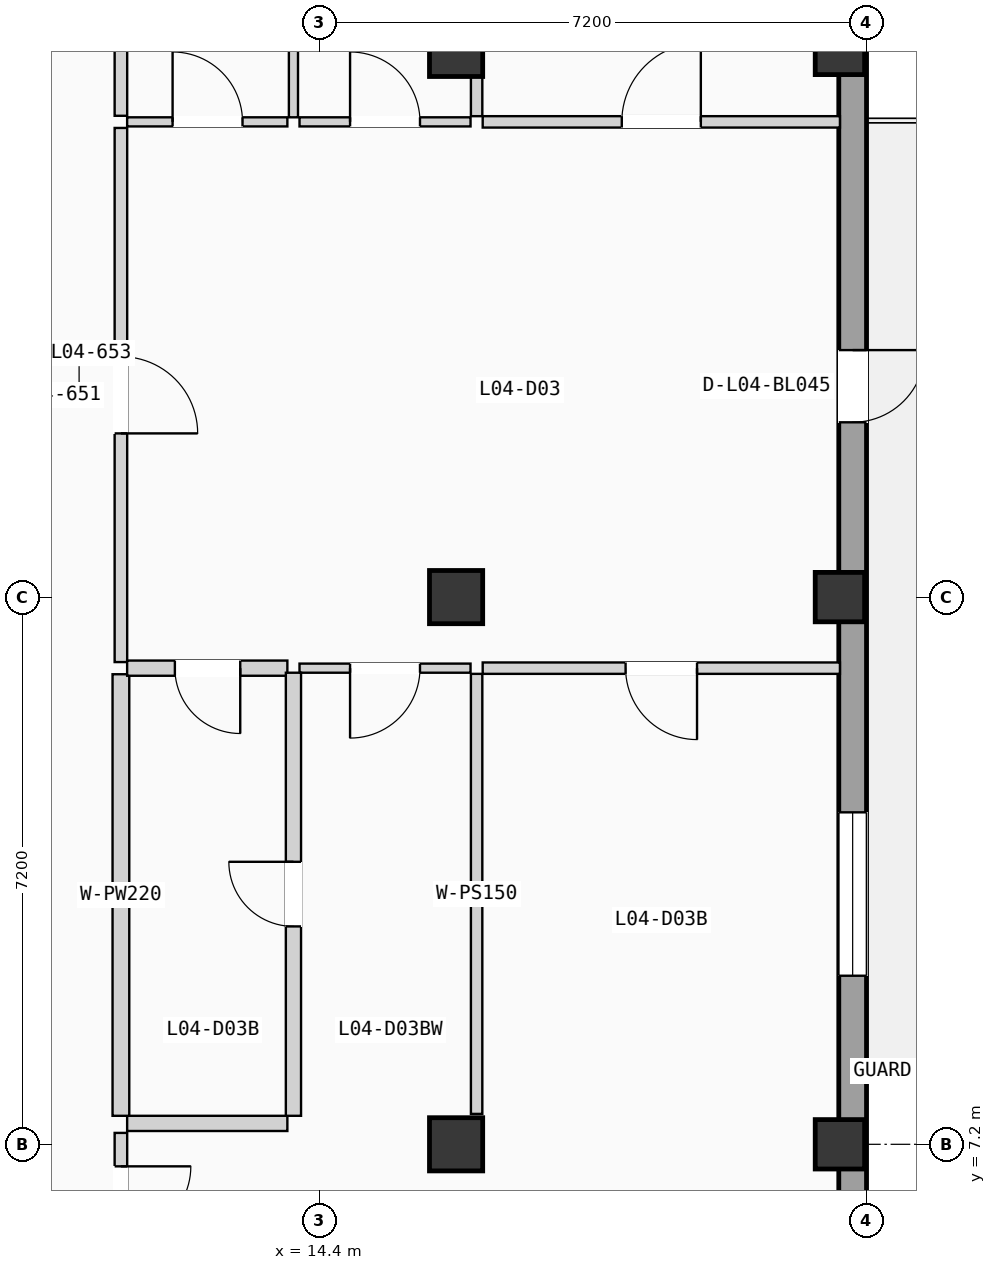
"""IFC4 building model, lengths in metres.
Left out: names, types, materials, properties, quantities, classifications, styles, units other than length and angle.
Written with IfcOpenShell. Run it as: python <this file> out.ifc"""

import sys

from ifc_helpers import new_model, si_unit, direction, frame, frame_2d, origin, origin_2d, place, context, subcontext, project, spatial, rectangle, extrude, element, fill, save


model = new_model("IFC4")
c1 = context("Model", 3, precision=1e-05, world=origin(), true_north=direction((0.0, 1.0)))
c2 = subcontext(c1, "Body", "Model", "MODEL_VIEW")
j1 = project(units=[si_unit("LENGTHUNIT", "METRE"), si_unit("PLANEANGLEUNIT", "RADIAN")], contexts=[c1])
p1 = place(None, origin())
s1 = spatial("IfcSite", under=j1, at=p1, CompositionType="ELEMENT")
p2 = place(p1, origin())
s2 = spatial("IfcBuilding", under=s1, at=p2, CompositionType="ELEMENT")
p3 = place(p2, frame((0.0, 0.0, 15.225)))
s3 = spatial("IfcBuildingStorey", under=s2, at=p3, CompositionType="ELEMENT", Elevation=15.225)
for number, where, z_axis, x_axis in (
    (1, (16.2, 7.2, 0.0), (0.0, 0.0, 1.0), (1.0, 0.0, 0.0)),
    (2, (16.2, 14.4, 0.0), (0.0, 0.0, 1.0), (1.0, 0.0, 0.0)),
    (3, (16.2, 21.6, 0.0), (0.0, 0.0, 1.0), (1.0, 0.0, 0.0)),
):
    element("IfcColumn", number, at=place(p3, frame(where, z_axis=z_axis, x_axis=x_axis)), inside=s3, PredefinedType="COLUMN", context=c2, shape_type="SweptSolid", body=[
        extrude(rectangle(XDim=0.7, YDim=0.7, at=origin_2d()), origin(), (0.0, 0.0, 1.0), 3.15),
    ])
for number, where, z_axis, x_axis in (
    (4, (21.25, 7.2, 0.0), (0.0, 0.0, 1.0), (1.0, 0.0, 0.0)),
    (5, (21.25, 14.4, 0.0), (0.0, 0.0, 1.0), (1.0, 0.0, 0.0)),
    (6, (21.25, 21.6, 0.0), (0.0, 0.0, 1.0), (1.0, 0.0, 0.0)),
):
    element("IfcColumn", number, at=place(p3, frame(where, z_axis=z_axis, x_axis=x_axis)), inside=s3, PredefinedType="COLUMN", context=c2, shape_type="SweptSolid", body=[
        extrude(rectangle(XDim=0.65, YDim=0.65, at=origin_2d()), origin(), (0.0, 0.0, 1.0), 3.15),
    ])
p4 = place(p3, frame((21.417, 0.365, 0.0), z_axis=(0.0, 0.0, 1.0), x_axis=(0.0, 1.0, 0.0)))
e7 = element("IfcWall", 7, at=p4, inside=s3, PredefinedType="SOLIDWALL", context=c2, shape_type="SweptSolid", body=[
    extrude(rectangle(XDim=49.67, YDim=0.365, at=frame_2d((24.835, 0.0))), origin(), (0.0, 0.0, 1.0), 2.89),
])
p5 = place(p4, frame((16.335, 0.0, 0.0)))
e8 = element("IfcOpeningElement", 8, at=p5, cuts=e7, PredefinedType="OPENING", context=c2, shape_type="SweptSolid", body=[
    extrude(rectangle(XDim=0.95, YDim=2.15, at=frame_2d((0.475, 1.075))), frame((0.0, 0.192, 0.0), z_axis=(0.0, -1.0, 0.0), x_axis=(1.0, 0.0, 0.0)), (0.0, 0.0, 1.0), 0.385),
])
p6 = place(p4, frame((9.053, 0.0, 0.9)))
e9 = element("IfcOpeningElement", 9, at=p6, cuts=e7, PredefinedType="OPENING", context=c2, shape_type="SweptSolid", body=[
    extrude(rectangle(XDim=2.15, YDim=1.2, at=frame_2d((1.075, 0.6))), frame((0.0, 0.192, 0.0), z_axis=(0.0, -1.0, 0.0), x_axis=(1.0, 0.0, 0.0)), (0.0, 0.0, 1.0), 0.385),
])
p7 = place(p4, frame((22.754, 0.0, 0.855)))
e10 = element("IfcOpeningElement", 10, at=p7, cuts=e7, PredefinedType="OPENING", context=c2, shape_type="SweptSolid", body=[
    extrude(rectangle(XDim=2.15, YDim=1.35, at=frame_2d((1.075, 0.675))), frame((0.0, 0.192, 0.0), z_axis=(0.0, -1.0, 0.0), x_axis=(1.0, 0.0, 0.0)), (0.0, 0.0, 1.0), 0.385),
])
p8 = place(p4, frame((32.43, 0.0, 0.0)))
e11 = element("IfcOpeningElement", 11, at=p8, cuts=e7, PredefinedType="OPENING", context=c2, shape_type="SweptSolid", body=[
    extrude(rectangle(XDim=1.08, YDim=2.18, at=frame_2d((0.54, 1.09))), frame((0.0, 0.192, 0.0), z_axis=(0.0, -1.0, 0.0), x_axis=(1.0, 0.0, 0.0)), (0.0, 0.0, 1.0), 0.385),
])
p9 = place(p4, frame((29.5, 0.0, 0.85)))
e12 = element("IfcOpeningElement", 12, at=p9, cuts=e7, PredefinedType="OPENING", context=c2, shape_type="SweptSolid", body=[
    extrude(rectangle(XDim=0.95, YDim=1.2, at=frame_2d((0.475, 0.6))), frame((0.0, 0.192, 0.0), z_axis=(0.0, -1.0, 0.0), x_axis=(1.0, 0.0, 0.0)), (0.0, 0.0, 1.0), 0.385),
])
p10 = place(p4, frame((38.904, 0.0, 0.555)))
e13 = element("IfcOpeningElement", 13, at=p10, cuts=e7, PredefinedType="OPENING", context=c2, shape_type="SweptSolid", body=[
    extrude(rectangle(XDim=2.15, YDim=1.65, at=frame_2d((1.075, 0.825))), frame((0.0, 0.192, 0.0), z_axis=(0.0, -1.0, 0.0), x_axis=(1.0, 0.0, 0.0)), (0.0, 0.0, 1.0), 0.385),
])
p11 = place(p3, frame((11.79, 5.53, 0.0), z_axis=(0.0, 0.0, 1.0), x_axis=(0.0, 1.0, 0.0)))
e14 = element("IfcWall", 14, at=p11, inside=s3, PredefinedType="PARTITIONING", context=c2, shape_type="SweptSolid", body=[
    extrude(rectangle(XDim=1.82, YDim=0.165, at=frame_2d((0.91, 0.0))), origin(), (0.0, 0.0, 1.0), 2.87),
])
p12 = place(p11, frame((0.46, 0.0, 0.0)))
e15 = element("IfcOpeningElement", 15, at=p12, cuts=e14, PredefinedType="OPENING", context=c2, shape_type="SweptSolid", body=[
    extrude(rectangle(XDim=0.92, YDim=2.04, at=frame_2d((0.46, 1.02))), frame((0.0, 0.093, 0.0), z_axis=(0.0, -1.0, 0.0), x_axis=(1.0, 0.0, 0.0)), (0.0, 0.0, 1.0), 0.185),
])
p13 = place(p3, frame((11.872, 7.475, 0.0), z_axis=(0.0, 0.0, 1.0), x_axis=(1.0, 0.0, 0.0)))
e16 = element("IfcWall", 16, at=p13, inside=s3, PredefinedType="PLUMBINGWALL", context=c2, shape_type="SweptSolid", body=[
    extrude(rectangle(XDim=2.108, YDim=0.2, at=frame_2d((1.054, 0.0))), origin(), (0.0, 0.0, 1.0), 2.87),
])
p14 = place(p3, frame((11.79, 13.545, 0.0), z_axis=(0.0, 0.0, 1.0), x_axis=(0.0, 1.0, 0.0)))
e17 = element("IfcWall", 17, at=p14, inside=s3, PredefinedType="PARTITIONING", context=c2, shape_type="SweptSolid", body=[
    extrude(rectangle(XDim=7.028, YDim=0.165, at=frame_2d((3.514, 0.0))), origin(), (0.0, 0.0, 1.0), 2.87),
])
p15 = place(p14, frame((3.009, 0.0, 0.0)))
e18 = element("IfcOpeningElement", 18, at=p15, cuts=e17, PredefinedType="OPENING", context=c2, shape_type="SweptSolid", body=[
    extrude(rectangle(XDim=1.01, YDim=2.11, at=frame_2d((0.505, 1.055))), frame((0.0, 0.093, 0.0), z_axis=(0.0, -1.0, 0.0), x_axis=(1.0, 0.0, 0.0)), (0.0, 0.0, 1.0), 0.185),
])
p16 = place(p3, frame((11.79, 7.575, 0.0), z_axis=(0.0, 0.0, 1.0), x_axis=(0.0, 1.0, 0.0)))
e19 = element("IfcWall", 19, at=p16, inside=s3, PredefinedType="PLUMBINGWALL", context=c2, shape_type="SweptSolid", body=[
    extrude(rectangle(XDim=5.81, YDim=0.22, at=frame_2d((2.905, 0.0))), origin(), (0.0, 0.0, 1.0), 2.87),
])
p17 = place(p3, frame((11.79, 20.733, 0.0), z_axis=(0.0, 0.0, 1.0), x_axis=(0.0, 1.0, 0.0)))
e20 = element("IfcWall", 20, at=p17, inside=s3, PredefinedType="PARTITIONING", context=c2, shape_type="SweptSolid", body=[
    extrude(rectangle(XDim=5.785, YDim=0.165, at=frame_2d((2.893, 0.0))), origin(), (0.0, 0.0, 1.0), 2.87),
])
p18 = place(p3, frame((11.872, 13.465, 0.0), z_axis=(0.0, 0.0, 1.0), x_axis=(1.0, 0.0, 0.0)))
e21 = element("IfcWall", 21, at=p18, inside=s3, PredefinedType="PLUMBINGWALL", context=c2, shape_type="SweptSolid", body=[
    extrude(rectangle(XDim=2.108, YDim=0.2, at=frame_2d((1.054, 0.0))), origin(), (0.0, 0.0, 1.0), 2.87),
])
p19 = place(p18, frame((0.628, 0.0, 0.0)))
e22 = element("IfcOpeningElement", 22, at=p19, cuts=e21, PredefinedType="OPENING", context=c2, shape_type="SweptSolid", body=[
    extrude(rectangle(XDim=0.86, YDim=2.0, at=frame_2d((0.43, 1.0))), frame((0.0, 0.11, 0.0), z_axis=(0.0, -1.0, 0.0), x_axis=(1.0, 0.0, 0.0)), (0.0, 0.0, 1.0), 0.22),
])
p20 = place(p3, frame((11.872, 20.653, 0.0), z_axis=(0.0, 0.0, 1.0), x_axis=(1.0, 0.0, 0.0)))
e23 = element("IfcWall", 23, at=p20, inside=s3, PredefinedType="PARTITIONING", context=c2, shape_type="SweptSolid", body=[
    extrude(rectangle(XDim=2.108, YDim=0.12, at=frame_2d((1.054, 0.0))), origin(), (0.0, 0.0, 1.0), 2.87),
])
p21 = place(p20, frame((0.598, 0.0, 0.0)))
e24 = element("IfcOpeningElement", 24, at=p21, cuts=e23, PredefinedType="OPENING", context=c2, shape_type="SweptSolid", body=[
    extrude(rectangle(XDim=0.92, YDim=2.02, at=frame_2d((0.46, 1.01))), frame((0.0, 0.07, 0.0), z_axis=(0.0, -1.0, 0.0), x_axis=(1.0, 0.0, 0.0)), (0.0, 0.0, 1.0), 0.14),
])
p22 = place(p3, frame((16.55, 13.465, 0.0), z_axis=(0.0, 0.0, 1.0), x_axis=(1.0, 0.0, 0.0)))
e25 = element("IfcWall", 25, at=p22, inside=s3, PredefinedType="PARTITIONING", context=c2, shape_type="SweptSolid", body=[
    extrude(rectangle(XDim=4.7, YDim=0.15, at=frame_2d((2.35, 0.0))), origin(), (0.0, 0.0, 1.0), 2.87),
])
p23 = place(p22, frame((1.88, 0.0, 0.0)))
e26 = element("IfcOpeningElement", 26, at=p23, cuts=e25, PredefinedType="OPENING", context=c2, shape_type="SweptSolid", body=[
    extrude(rectangle(XDim=0.94, YDim=2.06, at=frame_2d((0.47, 1.03))), frame((0.0, 0.085, 0.0), z_axis=(0.0, -1.0, 0.0), x_axis=(1.0, 0.0, 0.0)), (0.0, 0.0, 1.0), 0.17),
])
p24 = place(p3, frame((14.14, 13.465, 0.0), z_axis=(0.0, 0.0, 1.0), x_axis=(1.0, 0.0, 0.0)))
e27 = element("IfcWall", 27, at=p24, inside=s3, PredefinedType="PARTITIONING", context=c2, shape_type="SweptSolid", body=[
    extrude(rectangle(XDim=2.25, YDim=0.12, at=frame_2d((1.125, 0.0))), origin(), (0.0, 0.0, 1.0), 2.87),
])
p25 = place(p24, frame((0.665, 0.0, 0.0)))
e28 = element("IfcOpeningElement", 28, at=p25, cuts=e27, PredefinedType="OPENING", context=c2, shape_type="SweptSolid", body=[
    extrude(rectangle(XDim=0.92, YDim=2.02, at=frame_2d((0.46, 1.01))), frame((0.0, 0.07, 0.0), z_axis=(0.0, -1.0, 0.0), x_axis=(1.0, 0.0, 0.0)), (0.0, 0.0, 1.0), 0.14),
])
p26 = place(p3, frame((16.55, 20.653, 0.0), z_axis=(0.0, 0.0, 1.0), x_axis=(1.0, 0.0, 0.0)))
e29 = element("IfcWall", 29, at=p26, inside=s3, PredefinedType="PARTITIONING", context=c2, shape_type="SweptSolid", body=[
    extrude(rectangle(XDim=4.7, YDim=0.15, at=frame_2d((2.35, 0.0))), origin(), (0.0, 0.0, 1.0), 2.87),
])
p27 = place(p26, frame((1.83, 0.0, 0.0)))
e30 = element("IfcOpeningElement", 30, at=p27, cuts=e29, PredefinedType="OPENING", context=c2, shape_type="SweptSolid", body=[
    extrude(rectangle(XDim=1.04, YDim=2.08, at=frame_2d((0.52, 1.04))), frame((0.0, 0.085, 0.0), z_axis=(0.0, -1.0, 0.0), x_axis=(1.0, 0.0, 0.0)), (0.0, 0.0, 1.0), 0.17),
])
p28 = place(p3, frame((14.14, 20.653, 0.0), z_axis=(0.0, 0.0, 1.0), x_axis=(1.0, 0.0, 0.0)))
e31 = element("IfcWall", 31, at=p28, inside=s3, PredefinedType="PARTITIONING", context=c2, shape_type="SweptSolid", body=[
    extrude(rectangle(XDim=2.25, YDim=0.12, at=frame_2d((1.125, 0.0))), origin(), (0.0, 0.0, 1.0), 2.87),
])
p29 = place(p28, frame((0.665, 0.0, 0.0)))
e32 = element("IfcOpeningElement", 32, at=p29, cuts=e31, PredefinedType="OPENING", context=c2, shape_type="SweptSolid", body=[
    extrude(rectangle(XDim=0.92, YDim=2.02, at=frame_2d((0.46, 1.01))), frame((0.0, 0.07, 0.0), z_axis=(0.0, -1.0, 0.0), x_axis=(1.0, 0.0, 0.0)), (0.0, 0.0, 1.0), 0.14),
])
p30 = place(p3, frame((14.06, 7.575, 0.0), z_axis=(0.0, 0.0, 1.0), x_axis=(0.0, 1.0, 0.0)))
e33 = element("IfcWall", 33, at=p30, inside=s3, PredefinedType="PLUMBINGWALL", context=c2, shape_type="SweptSolid", body=[
    extrude(rectangle(XDim=5.83, YDim=0.2, at=frame_2d((2.915, 0.0))), origin(), (0.0, 0.0, 1.0), 2.87),
])
p31 = place(p30, frame((2.492, 0.0, 0.0)))
e34 = element("IfcOpeningElement", 34, at=p31, cuts=e33, PredefinedType="OPENING", context=c2, shape_type="SweptSolid", body=[
    extrude(rectangle(XDim=0.85, YDim=2.01, at=frame_2d((0.425, 1.005))), frame((0.0, 0.11, 0.0), z_axis=(0.0, -1.0, 0.0), x_axis=(1.0, 0.0, 0.0)), (0.0, 0.0, 1.0), 0.22),
])
p32 = place(p3, frame((14.06, 20.713, 0.0), z_axis=(0.0, 0.0, 1.0), x_axis=(0.0, 1.0, 0.0)))
e35 = element("IfcWall", 35, at=p32, inside=s3, PredefinedType="PARTITIONING", context=c2, shape_type="SweptSolid", body=[
    extrude(rectangle(XDim=5.805, YDim=0.12, at=frame_2d((2.903, 0.0))), origin(), (0.0, 0.0, 1.0), 2.87),
])
p33 = place(p3, frame((16.47, 7.6, 0.0), z_axis=(0.0, 0.0, 1.0), x_axis=(0.0, 1.0, 0.0)))
e36 = element("IfcWall", 36, at=p33, inside=s3, PredefinedType="PARTITIONING", context=c2, shape_type="SweptSolid", body=[
    extrude(rectangle(XDim=5.79, YDim=0.15, at=frame_2d((2.895, 0.0))), origin(), (0.0, 0.0, 1.0), 2.87),
])
p34 = place(p3, frame((16.47, 20.728, 0.0), z_axis=(0.0, 0.0, 1.0), x_axis=(0.0, 1.0, 0.0)))
e37 = element("IfcWall", 37, at=p34, inside=s3, PredefinedType="PARTITIONING", context=c2, shape_type="SweptSolid", body=[
    extrude(rectangle(XDim=5.79, YDim=0.15, at=frame_2d((2.895, 0.0))), origin(), (0.0, 0.0, 1.0), 2.87),
])
p35 = place(p5, frame((0.95, 0.0, 0.0), z_axis=(0.0, 0.0, 1.0), x_axis=(-1.0, 0.0, 0.0)))
e38 = element("IfcDoor", 38, at=p35, inside=s3, OperationType="SINGLE_SWING_RIGHT", PredefinedType="DOOR", context=c2, shape_type="SweptSolid", body=[
    extrude(rectangle(XDim=0.95, YDim=2.15, at=frame_2d((0.475, 1.075))), frame((0.0, 0.025, 0.0), z_axis=(0.0, -1.0, 0.0), x_axis=(1.0, 0.0, 0.0)), (0.0, 0.0, 1.0), 0.05),
])
fill(e8, e38)
p36 = place(p6, origin())
e39 = element("IfcWindow", 39, at=p36, inside=s3, PartitioningType="DOUBLE_PANEL_VERTICAL", PredefinedType="WINDOW", context=c2, shape_type="SweptSolid", body=[
    extrude(rectangle(XDim=2.15, YDim=1.2, at=frame_2d((1.075, 0.6))), frame((0.0, 0.03, 0.0), z_axis=(0.0, -1.0, 0.0), x_axis=(1.0, 0.0, 0.0)), (0.0, 0.0, 1.0), 0.06),
])
fill(e9, e39)
p37 = place(p12, frame((0.92, 0.0, 0.0), z_axis=(0.0, 0.0, 1.0), x_axis=(-1.0, 0.0, 0.0)))
e40 = element("IfcDoor", 40, at=p37, inside=s3, OperationType="SINGLE_SWING_RIGHT", PredefinedType="DOOR", context=c2, shape_type="SweptSolid", body=[
    extrude(rectangle(XDim=0.92, YDim=2.04, at=frame_2d((0.46, 1.02))), frame((0.0, 0.025, 0.0), z_axis=(0.0, -1.0, 0.0), x_axis=(1.0, 0.0, 0.0)), (0.0, 0.0, 1.0), 0.05),
])
fill(e15, e40)
p38 = place(p15, frame((1.01, 0.0, 0.0), z_axis=(0.0, 0.0, 1.0), x_axis=(-1.0, 0.0, 0.0)))
e41 = element("IfcDoor", 41, at=p38, inside=s3, OperationType="SINGLE_SWING_LEFT", PredefinedType="DOOR", context=c2, shape_type="SweptSolid", body=[
    extrude(rectangle(XDim=1.01, YDim=2.11, at=frame_2d((0.505, 1.055))), frame((0.0, 0.025, 0.0), z_axis=(0.0, -1.0, 0.0), x_axis=(1.0, 0.0, 0.0)), (0.0, 0.0, 1.0), 0.05),
])
fill(e18, e41)
p39 = place(p19, frame((0.86, 0.0, 0.0), z_axis=(0.0, 0.0, 1.0), x_axis=(-1.0, 0.0, 0.0)))
e42 = element("IfcDoor", 42, at=p39, inside=s3, OperationType="SINGLE_SWING_RIGHT", PredefinedType="DOOR", context=c2, shape_type="SweptSolid", body=[
    extrude(rectangle(XDim=0.86, YDim=2.0, at=frame_2d((0.43, 1.0))), frame((0.0, 0.025, 0.0), z_axis=(0.0, -1.0, 0.0), x_axis=(1.0, 0.0, 0.0)), (0.0, 0.0, 1.0), 0.05),
])
fill(e22, e42)
p40 = place(p21, origin())
e43 = element("IfcDoor", 43, at=p40, inside=s3, OperationType="SINGLE_SWING_LEFT", PredefinedType="DOOR", context=c2, shape_type="SweptSolid", body=[
    extrude(rectangle(XDim=0.92, YDim=2.02, at=frame_2d((0.46, 1.01))), frame((0.0, 0.025, 0.0), z_axis=(0.0, -1.0, 0.0), x_axis=(1.0, 0.0, 0.0)), (0.0, 0.0, 1.0), 0.05),
])
fill(e24, e43)
p41 = place(p23, frame((0.94, 0.0, 0.0), z_axis=(0.0, 0.0, 1.0), x_axis=(-1.0, 0.0, 0.0)))
e44 = element("IfcDoor", 44, at=p41, inside=s3, OperationType="SINGLE_SWING_RIGHT", PredefinedType="DOOR", context=c2, shape_type="SweptSolid", body=[
    extrude(rectangle(XDim=0.94, YDim=2.06, at=frame_2d((0.47, 1.03))), frame((0.0, 0.025, 0.0), z_axis=(0.0, -1.0, 0.0), x_axis=(1.0, 0.0, 0.0)), (0.0, 0.0, 1.0), 0.05),
])
fill(e26, e44)
p42 = place(p25, frame((0.92, 0.0, 0.0), z_axis=(0.0, 0.0, 1.0), x_axis=(-1.0, 0.0, 0.0)))
e45 = element("IfcDoor", 45, at=p42, inside=s3, OperationType="SINGLE_SWING_LEFT", PredefinedType="DOOR", context=c2, shape_type="SweptSolid", body=[
    extrude(rectangle(XDim=0.92, YDim=2.02, at=frame_2d((0.46, 1.01))), frame((0.0, 0.025, 0.0), z_axis=(0.0, -1.0, 0.0), x_axis=(1.0, 0.0, 0.0)), (0.0, 0.0, 1.0), 0.05),
])
fill(e28, e45)
p43 = place(p27, origin())
e46 = element("IfcDoor", 46, at=p43, inside=s3, OperationType="SINGLE_SWING_RIGHT", PredefinedType="DOOR", context=c2, shape_type="SweptSolid", body=[
    extrude(rectangle(XDim=1.04, YDim=2.08, at=frame_2d((0.52, 1.04))), frame((0.0, 0.025, 0.0), z_axis=(0.0, -1.0, 0.0), x_axis=(1.0, 0.0, 0.0)), (0.0, 0.0, 1.0), 0.05),
])
fill(e30, e46)
p44 = place(p29, origin())
e47 = element("IfcDoor", 47, at=p44, inside=s3, OperationType="SINGLE_SWING_LEFT", PredefinedType="DOOR", context=c2, shape_type="SweptSolid", body=[
    extrude(rectangle(XDim=0.92, YDim=2.02, at=frame_2d((0.46, 1.01))), frame((0.0, 0.025, 0.0), z_axis=(0.0, -1.0, 0.0), x_axis=(1.0, 0.0, 0.0)), (0.0, 0.0, 1.0), 0.05),
])
fill(e32, e47)
p45 = place(p31, origin())
e48 = element("IfcDoor", 48, at=p45, inside=s3, OperationType="SINGLE_SWING_RIGHT", PredefinedType="DOOR", context=c2, shape_type="SweptSolid", body=[
    extrude(rectangle(XDim=0.85, YDim=2.01, at=frame_2d((0.425, 1.005))), frame((0.0, 0.025, 0.0), z_axis=(0.0, -1.0, 0.0), x_axis=(1.0, 0.0, 0.0)), (0.0, 0.0, 1.0), 0.05),
])
fill(e34, e48)
save(model, sys.argv[1])
